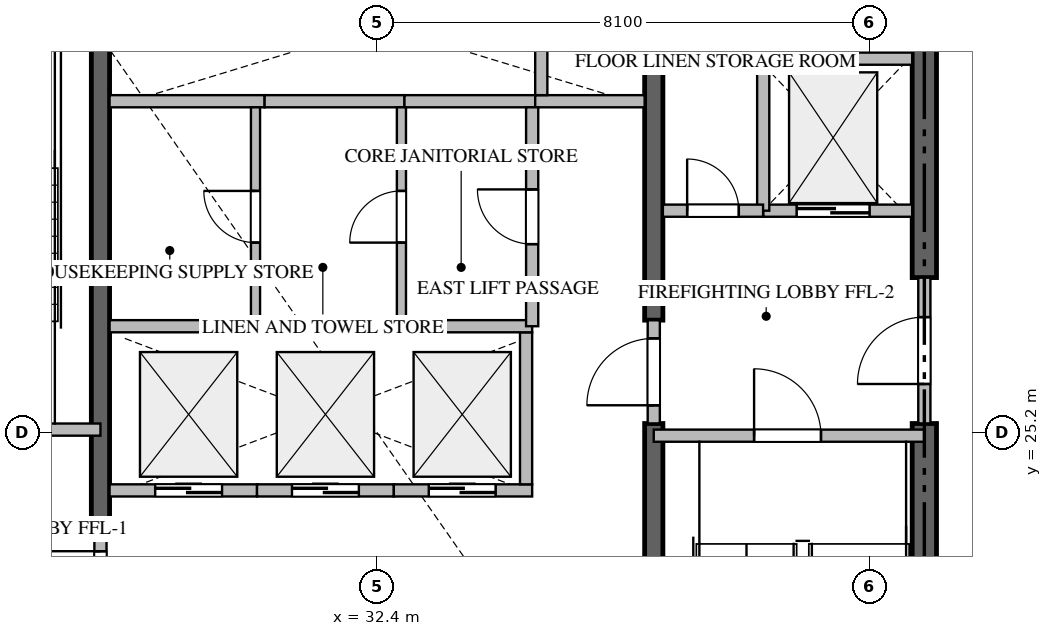
"""IFC4 building model, lengths in metres.
Left out: names, types, materials, properties, quantities, classifications, styles, units other than length and angle.
Written with IfcOpenShell. Run it as: python <this file> out.ifc"""

import sys

from ifc_helpers import new_model, si_unit, direction, frame, frame_2d, origin, place, context, subcontext, project, spatial, rectangle, extrude, source, transform, mapped, element, fill, save


model = new_model("IFC4")
c1 = context("Model", 3, precision=1e-05, world=origin(), true_north=direction((0.0, 1.0)))
c2 = subcontext(c1, "Body", "Model", "MODEL_VIEW")
j1 = project(units=[si_unit("LENGTHUNIT", "METRE"), si_unit("PLANEANGLEUNIT", "RADIAN")], contexts=[c1])
p1 = place(None, origin())
s1 = spatial("IfcSite", under=j1, at=p1, CompositionType="ELEMENT")
p2 = place(p1, origin())
s2 = spatial("IfcBuilding", under=s1, at=p2, CompositionType="ELEMENT")
p3 = place(p2, frame((0.0, 0.0, 176.4)))
s3 = spatial("IfcBuildingStorey", under=s2, at=p3, CompositionType="ELEMENT", Elevation=176.4)
p4 = place(p3, frame((41.4, 17.0, -0.26), z_axis=(0.0, 0.0, 1.0), x_axis=(0.0, 1.0, 0.0)))
e1 = element("IfcWall", 1, at=p4, inside=s3, PredefinedType="SHEAR", context=c2, shape_type="SweptSolid", body=[
    extrude(rectangle(XDim=8.35, YDim=0.4, at=frame_2d((4.175, 0.0))), origin(), (0.0, 0.0, 1.0), 3.748),
])
p5 = place(p3, frame((41.4, 27.75, -0.26), z_axis=(0.0, 0.0, 1.0), x_axis=(0.0, 1.0, 0.0)))
e2 = element("IfcWall", 2, at=p5, inside=s3, PredefinedType="SHEAR", context=c2, shape_type="SweptSolid", body=[
    extrude(rectangle(XDim=5.65, YDim=0.4, at=frame_2d((2.825, 0.0))), origin(), (0.0, 0.0, 1.0), 3.748),
])
p6 = place(p3, frame((27.85, 23.55, -0.26), z_axis=(0.0, 0.0, 1.0), x_axis=(0.0, 1.0, 0.0)))
e3 = element("IfcWall", 3, at=p6, inside=s3, PredefinedType="SHEAR", context=c2, shape_type="SweptSolid", body=[
    extrude(rectangle(XDim=9.85, YDim=0.3, at=frame_2d((4.925, 0.0))), origin(), (0.0, 0.0, 1.0), 3.748),
])
p7 = place(p3, frame((36.95, 17.0, -0.26), z_axis=(0.0, 0.0, 1.0), x_axis=(0.0, 1.0, 0.0)))
e4 = element("IfcWall", 4, at=p7, inside=s3, PredefinedType="SHEAR", context=c2, shape_type="SweptSolid", body=[
    extrude(rectangle(XDim=8.35, YDim=0.3, at=frame_2d((4.175, 0.0))), origin(), (0.0, 0.0, 1.0), 3.748),
])
p8 = place(p3, frame((36.95, 27.05, -0.26), z_axis=(0.0, 0.0, 1.0), x_axis=(0.0, 1.0, 0.0)))
e5 = element("IfcWall", 5, at=p8, inside=s3, PredefinedType="SHEAR", context=c2, shape_type="SweptSolid", body=[
    extrude(rectangle(XDim=6.35, YDim=0.3, at=frame_2d((3.175, 0.0))), origin(), (0.0, 0.0, 1.0), 3.748),
])
p9 = place(p3, frame((23.4, 25.25, 0.0), z_axis=(0.0, 0.0, 1.0), x_axis=(1.0, 0.0, 0.0)))
e6 = element("IfcWall", 6, at=p9, inside=s3, PredefinedType="STANDARD", context=c2, shape_type="SweptSolid", body=[
    extrude(rectangle(XDim=4.45, YDim=0.2, at=frame_2d((2.225, 0.0))), origin(), (0.0, 0.0, 1.0), 3.49),
])
p10 = place(p9, frame((1.65, 0.0, 0.0)))
e7 = element("IfcOpeningElement", 7, at=p10, cuts=e6, PredefinedType="OPENING", context=c2, shape_type="SweptSolid", body=[
    extrude(rectangle(XDim=1.1, YDim=2.15, at=frame_2d((0.55, 1.075))), frame((0.0, 0.11, 0.0), z_axis=(0.0, -1.0, 0.0), x_axis=(1.0, 0.0, 0.0)), (0.0, 0.0, 1.0), 0.22),
])
p11 = place(p3, frame((36.95, 25.15, 0.0), z_axis=(0.0, 0.0, 1.0), x_axis=(1.0, 0.0, 0.0)))
e8 = element("IfcWall", 8, at=p11, inside=s3, PredefinedType="STANDARD", context=c2, shape_type="SweptSolid", body=[
    extrude(rectangle(XDim=4.45, YDim=0.2, at=frame_2d((2.225, 0.0))), origin(), (0.0, 0.0, 1.0), 3.49),
])
p12 = place(p11, frame((1.65, 0.0, 0.0)))
e9 = element("IfcOpeningElement", 9, at=p12, cuts=e8, PredefinedType="OPENING", context=c2, shape_type="SweptSolid", body=[
    extrude(rectangle(XDim=1.1, YDim=2.15, at=frame_2d((0.55, 1.075))), frame((0.0, 0.11, 0.0), z_axis=(0.0, -1.0, 0.0), x_axis=(1.0, 0.0, 0.0)), (0.0, 0.0, 1.0), 0.22),
])
p13 = place(p3, frame((38.75, 28.85, 0.0), z_axis=(0.0, 0.0, 1.0), x_axis=(1.0, 0.0, 0.0)))
e10 = element("IfcWall", 10, at=p13, inside=s3, PredefinedType="STANDARD", context=c2, shape_type="SweptSolid", body=[
    extrude(rectangle(XDim=2.45, YDim=0.2, at=frame_2d((1.225, 0.0))), origin(), (0.0, 0.0, 1.0), 3.49),
])
p14 = place(p13, frame((0.55, 0.0, 0.0)))
e11 = element("IfcOpeningElement", 11, at=p14, cuts=e10, PredefinedType="OPENING", context=c2, shape_type="SweptSolid", body=[
    extrude(rectangle(XDim=1.2, YDim=2.2, at=frame_2d((0.6, 1.1))), frame((0.0, 0.11, 0.0), z_axis=(0.0, -1.0, 0.0), x_axis=(1.0, 0.0, 0.0)), (0.0, 0.0, 1.0), 0.22),
])
p15 = place(p3, frame((28.0, 24.25, 0.0), z_axis=(0.0, 0.0, 1.0), x_axis=(1.0, 0.0, 0.0)))
e12 = element("IfcWall", 12, at=p15, inside=s3, PredefinedType="STANDARD", context=c2, shape_type="SweptSolid", body=[
    extrude(rectangle(XDim=2.425, YDim=0.2, at=frame_2d((1.212, 0.0))), origin(), (0.0, 0.0, 1.0), 3.49),
])
p16 = place(p15, frame((0.75, 0.0, 0.0)))
e13 = element("IfcOpeningElement", 13, at=p16, cuts=e12, PredefinedType="OPENING", context=c2, shape_type="SweptSolid", body=[
    extrude(rectangle(XDim=1.1, YDim=2.2, at=frame_2d((0.55, 1.1))), frame((0.0, 0.11, 0.0), z_axis=(0.0, -1.0, 0.0), x_axis=(1.0, 0.0, 0.0)), (0.0, 0.0, 1.0), 0.22),
])
p17 = place(p3, frame((30.425, 24.25, 0.0), z_axis=(0.0, 0.0, 1.0), x_axis=(1.0, 0.0, 0.0)))
e14 = element("IfcWall", 14, at=p17, inside=s3, PredefinedType="STANDARD", context=c2, shape_type="SweptSolid", body=[
    extrude(rectangle(XDim=2.25, YDim=0.2, at=frame_2d((1.125, 0.0))), origin(), (0.0, 0.0, 1.0), 3.49),
])
p18 = place(p17, frame((0.575, 0.0, 0.0)))
e15 = element("IfcOpeningElement", 15, at=p18, cuts=e14, PredefinedType="OPENING", context=c2, shape_type="SweptSolid", body=[
    extrude(rectangle(XDim=1.1, YDim=2.2, at=frame_2d((0.55, 1.1))), frame((0.0, 0.11, 0.0), z_axis=(0.0, -1.0, 0.0), x_axis=(1.0, 0.0, 0.0)), (0.0, 0.0, 1.0), 0.22),
])
p19 = place(p3, frame((32.675, 24.25, 0.0), z_axis=(0.0, 0.0, 1.0), x_axis=(1.0, 0.0, 0.0)))
e16 = element("IfcWall", 16, at=p19, inside=s3, PredefinedType="STANDARD", context=c2, shape_type="SweptSolid", body=[
    extrude(rectangle(XDim=2.275, YDim=0.2, at=frame_2d((1.137, 0.0))), origin(), (0.0, 0.0, 1.0), 3.49),
])
p20 = place(p19, frame((0.575, 0.0, 0.0)))
e17 = element("IfcOpeningElement", 17, at=p20, cuts=e16, PredefinedType="OPENING", context=c2, shape_type="SweptSolid", body=[
    extrude(rectangle(XDim=1.1, YDim=2.2, at=frame_2d((0.55, 1.1))), frame((0.0, 0.11, 0.0), z_axis=(0.0, -1.0, 0.0), x_axis=(1.0, 0.0, 0.0)), (0.0, 0.0, 1.0), 0.22),
])
p21 = place(p3, frame((34.85, 24.35, 0.0), z_axis=(0.0, 0.0, 1.0), x_axis=(0.0, 1.0, 0.0)))
e18 = element("IfcWall", 18, at=p21, inside=s3, PredefinedType="STANDARD", context=c2, shape_type="SweptSolid", body=[
    extrude(rectangle(XDim=2.5, YDim=0.2, at=frame_2d((1.25, 0.0))), origin(), (0.0, 0.0, 1.0), 3.49),
])
p22 = place(p3, frame((28.0, 30.65, 0.0), z_axis=(0.0, 0.0, 1.0), x_axis=(1.0, 0.0, 0.0)))
e19 = element("IfcWall", 19, at=p22, inside=s3, PredefinedType="STANDARD", context=c2, shape_type="SweptSolid", body=[
    extrude(rectangle(XDim=2.55, YDim=0.2, at=frame_2d((1.275, 0.0))), origin(), (0.0, 0.0, 1.0), 3.49),
])
p23 = place(p3, frame((30.55, 30.65, 0.0), z_axis=(0.0, 0.0, 1.0), x_axis=(1.0, 0.0, 0.0)))
e20 = element("IfcWall", 20, at=p23, inside=s3, PredefinedType="STANDARD", context=c2, shape_type="SweptSolid", body=[
    extrude(rectangle(XDim=2.3, YDim=0.2, at=frame_2d((1.15, 0.0))), origin(), (0.0, 0.0, 1.0), 3.49),
])
p24 = place(p3, frame((32.85, 30.65, 0.0), z_axis=(0.0, 0.0, 1.0), x_axis=(1.0, 0.0, 0.0)))
e21 = element("IfcWall", 21, at=p24, inside=s3, PredefinedType="STANDARD", context=c2, shape_type="SweptSolid", body=[
    extrude(rectangle(XDim=2.15, YDim=0.2, at=frame_2d((1.075, 0.0))), origin(), (0.0, 0.0, 1.0), 3.49),
])
p25 = place(p3, frame((35.0, 30.65, 0.0), z_axis=(0.0, 0.0, 1.0), x_axis=(1.0, 0.0, 0.0)))
e22 = element("IfcWall", 22, at=p25, inside=s3, PredefinedType="STANDARD", context=c2, shape_type="SweptSolid", body=[
    extrude(rectangle(XDim=1.8, YDim=0.2, at=frame_2d((0.9, 0.0))), origin(), (0.0, 0.0, 1.0), 3.49),
])
p26 = place(p3, frame((35.1, 30.75, 0.0), z_axis=(0.0, 0.0, 1.0), x_axis=(0.0, 1.0, 0.0)))
e23 = element("IfcWall", 23, at=p26, inside=s3, PredefinedType="STANDARD", context=c2, shape_type="SweptSolid", body=[
    extrude(rectangle(XDim=2.65, YDim=0.2, at=frame_2d((1.325, 0.0))), origin(), (0.0, 0.0, 1.0), 3.49),
])
p27 = place(p3, frame((38.75, 28.85, 0.0), z_axis=(0.0, 0.0, 1.0), x_axis=(0.0, 1.0, 0.0)))
e24 = element("IfcWall", 24, at=p27, inside=s3, PredefinedType="STANDARD", context=c2, shape_type="SweptSolid", body=[
    extrude(rectangle(XDim=2.5, YDim=0.2, at=frame_2d((1.25, 0.0))), origin(), (0.0, 0.0, 1.0), 3.49),
])
p28 = place(p3, frame((38.75, 31.35, 0.0), z_axis=(0.0, 0.0, 1.0), x_axis=(1.0, 0.0, 0.0)))
e25 = element("IfcWall", 25, at=p28, inside=s3, PredefinedType="STANDARD", context=c2, shape_type="SweptSolid", body=[
    extrude(rectangle(XDim=2.45, YDim=0.2, at=frame_2d((1.225, 0.0))), origin(), (0.0, 0.0, 1.0), 3.49),
])
p29 = place(p3, frame((37.1, 28.85, 0.0), z_axis=(0.0, 0.0, 1.0), x_axis=(1.0, 0.0, 0.0)))
e26 = element("IfcWall", 26, at=p29, inside=s3, PredefinedType="STANDARD", context=c2, shape_type="SweptSolid", body=[
    extrude(rectangle(XDim=1.648, YDim=0.2, at=frame_2d((0.824, 0.0))), origin(), (0.0, 0.0, 1.0), 3.49),
])
p30 = place(p29, frame((0.399, 0.0, 0.0)))
e27 = element("IfcOpeningElement", 27, at=p30, cuts=e26, PredefinedType="OPENING", context=c2, shape_type="SweptSolid", body=[
    extrude(rectangle(XDim=0.85, YDim=2.1, at=frame_2d((0.425, 1.05))), frame((0.0, 0.11, 0.0), z_axis=(0.0, -1.0, 0.0), x_axis=(1.0, 0.0, 0.0)), (0.0, 0.0, 1.0), 0.22),
])
p31 = place(p3, frame((41.4, 25.352, 0.0), z_axis=(0.0, 0.0, 1.0), x_axis=(0.0, 1.0, 0.0)))
e28 = element("IfcWall", 28, at=p31, inside=s3, PredefinedType="STANDARD", context=c2, shape_type="SweptSolid", body=[
    extrude(rectangle(XDim=2.396, YDim=0.2, at=frame_2d((1.198, 0.0))), origin(), (0.0, 0.0, 1.0), 3.49),
])
p32 = place(p31, frame((0.648, 0.0, 0.0)))
e29 = element("IfcOpeningElement", 29, at=p32, cuts=e28, PredefinedType="OPENING", context=c2, shape_type="SweptSolid", body=[
    extrude(rectangle(XDim=1.1, YDim=2.15, at=frame_2d((0.55, 1.075))), frame((0.0, 0.11, 0.0), z_axis=(0.0, -1.0, 0.0), x_axis=(1.0, 0.0, 0.0)), (0.0, 0.0, 1.0), 0.22),
])
p33 = place(p3, frame((27.85, 21.852, 0.0), z_axis=(0.0, 0.0, 1.0), x_axis=(0.0, 1.0, 0.0)))
e30 = element("IfcWall", 30, at=p33, inside=s3, PredefinedType="STANDARD", context=c2, shape_type="SweptSolid", body=[
    extrude(rectangle(XDim=1.696, YDim=0.2, at=frame_2d((0.848, 0.0))), origin(), (0.0, 0.0, 1.0), 3.49),
])
p34 = place(p33, frame((0.298, 0.0, 0.0)))
e31 = element("IfcOpeningElement", 31, at=p34, cuts=e30, PredefinedType="OPENING", context=c2, shape_type="SweptSolid", body=[
    extrude(rectangle(XDim=1.1, YDim=2.15, at=frame_2d((0.55, 1.075))), frame((0.0, 0.11, 0.0), z_axis=(0.0, -1.0, 0.0), x_axis=(1.0, 0.0, 0.0)), (0.0, 0.0, 1.0), 0.22),
])
p35 = place(p3, frame((36.95, 25.352, 0.0), z_axis=(0.0, 0.0, 1.0), x_axis=(0.0, 1.0, 0.0)))
e32 = element("IfcWall", 32, at=p35, inside=s3, PredefinedType="STANDARD", context=c2, shape_type="SweptSolid", body=[
    extrude(rectangle(XDim=1.696, YDim=0.2, at=frame_2d((0.848, 0.0))), origin(), (0.0, 0.0, 1.0), 3.49),
])
p36 = place(p35, frame((0.298, 0.0, 0.0)))
e33 = element("IfcOpeningElement", 33, at=p36, cuts=e32, PredefinedType="OPENING", context=c2, shape_type="SweptSolid", body=[
    extrude(rectangle(XDim=1.1, YDim=2.15, at=frame_2d((0.55, 1.075))), frame((0.0, 0.11, 0.0), z_axis=(0.0, -1.0, 0.0), x_axis=(1.0, 0.0, 0.0)), (0.0, 0.0, 1.0), 0.22),
])
p37 = place(p3, frame((28.0, 26.95, 0.0), z_axis=(0.0, 0.0, 1.0), x_axis=(1.0, 0.0, 0.0)))
e34 = element("IfcWall", 34, at=p37, inside=s3, PredefinedType="STANDARD", context=c2, shape_type="SweptSolid", body=[
    extrude(rectangle(XDim=6.95, YDim=0.2, at=frame_2d((3.475, 0.0))), origin(), (0.0, 0.0, 1.0), 3.49),
])
p38 = place(p3, frame((39.4, 31.35, 0.0), z_axis=(0.0, 0.0, 1.0), x_axis=(0.0, 1.0, 0.0)))
e35 = element("IfcWall", 35, at=p38, inside=s3, PredefinedType="PARTITIONING", context=c2, shape_type="SweptSolid", body=[
    extrude(rectangle(XDim=2.05, YDim=0.15, at=frame_2d((1.025, 0.0))), origin(), (0.0, 0.0, 1.0), 3.49),
])
p39 = place(p38, frame((0.6, 0.0, 0.0)))
e36 = element("IfcOpeningElement", 36, at=p39, cuts=e35, PredefinedType="OPENING", context=c2, shape_type="SweptSolid", body=[
    extrude(rectangle(XDim=0.85, YDim=2.1, at=frame_2d((0.425, 1.05))), frame((0.0, 0.085, 0.0), z_axis=(0.0, -1.0, 0.0), x_axis=(1.0, 0.0, 0.0)), (0.0, 0.0, 1.0), 0.17),
])
p40 = place(p3, frame((34.95, 26.95, 0.0), z_axis=(0.0, 0.0, 1.0), x_axis=(0.0, 1.0, 0.0)))
e37 = element("IfcWall", 37, at=p40, inside=s3, PredefinedType="STANDARD", context=c2, shape_type="SweptSolid", body=[
    extrude(rectangle(XDim=3.6, YDim=0.2, at=frame_2d((1.8, 0.0))), origin(), (0.0, 0.0, 1.0), 3.49),
])
p41 = place(p40, frame((1.35, 0.0, 0.0)))
e38 = element("IfcOpeningElement", 38, at=p41, cuts=e37, PredefinedType="OPENING", context=c2, shape_type="SweptSolid", body=[
    extrude(rectangle(XDim=0.9, YDim=2.1, at=frame_2d((0.45, 1.05))), frame((0.0, 0.11, 0.0), z_axis=(0.0, -1.0, 0.0), x_axis=(1.0, 0.0, 0.0)), (0.0, 0.0, 1.0), 0.22),
])
p42 = place(p3, frame((32.8, 26.95, 0.0), z_axis=(0.0, 0.0, 1.0), x_axis=(0.0, 1.0, 0.0)))
e39 = element("IfcWall", 39, at=p42, inside=s3, PredefinedType="PARTITIONING", context=c2, shape_type="SweptSolid", body=[
    extrude(rectangle(XDim=3.6, YDim=0.15, at=frame_2d((1.8, 0.0))), origin(), (0.0, 0.0, 1.0), 3.49),
])
p43 = place(p42, frame((1.375, 0.0, 0.0)))
e40 = element("IfcOpeningElement", 40, at=p43, cuts=e39, PredefinedType="OPENING", context=c2, shape_type="SweptSolid", body=[
    extrude(rectangle(XDim=0.85, YDim=2.1, at=frame_2d((0.425, 1.05))), frame((0.0, 0.085, 0.0), z_axis=(0.0, -1.0, 0.0), x_axis=(1.0, 0.0, 0.0)), (0.0, 0.0, 1.0), 0.17),
])
p44 = place(p3, frame((30.4, 26.95, 0.0), z_axis=(0.0, 0.0, 1.0), x_axis=(0.0, 1.0, 0.0)))
e41 = element("IfcWall", 41, at=p44, inside=s3, PredefinedType="PARTITIONING", context=c2, shape_type="SweptSolid", body=[
    extrude(rectangle(XDim=3.6, YDim=0.15, at=frame_2d((1.8, 0.0))), origin(), (0.0, 0.0, 1.0), 3.49),
])
p45 = place(p44, frame((1.375, 0.0, 0.0)))
e42 = element("IfcOpeningElement", 42, at=p45, cuts=e41, PredefinedType="OPENING", context=c2, shape_type="SweptSolid", body=[
    extrude(rectangle(XDim=0.85, YDim=2.1, at=frame_2d((0.425, 1.05))), frame((0.0, 0.085, 0.0), z_axis=(0.0, -1.0, 0.0), x_axis=(1.0, 0.0, 0.0)), (0.0, 0.0, 1.0), 0.17),
])
m1 = source(origin(), c2, "Body", "SweptSolid", [
    extrude(rectangle(XDim=1.1, YDim=2.15, at=frame_2d((0.55, 1.075))), frame((0.0, 0.025, 0.0), z_axis=(0.0, -1.0, 0.0), x_axis=(1.0, 0.0, 0.0)), (0.0, 0.0, 1.0), 0.05),
])
p46 = place(p12, origin())
e43 = element("IfcDoor", 43, at=p46, inside=s3, OperationType="SINGLE_SWING_LEFT", PredefinedType="DOOR", context=c2, shape_type="MappedRepresentation", body=[
    mapped(m1, transform((0.0, 0.0, 0.0), scale=1.0)),
])
fill(e9, e43)
m2 = source(origin(), c2, "Body", "SweptSolid", [
    extrude(rectangle(XDim=1.2, YDim=2.2, at=frame_2d((0.6, 1.1))), frame((0.0, 0.025, 0.0), z_axis=(0.0, -1.0, 0.0), x_axis=(1.0, 0.0, 0.0)), (0.0, 0.0, 1.0), 0.05),
])
p47 = place(p14, origin())
e44 = element("IfcDoor", 44, at=p47, inside=s3, OperationType="DOUBLE_DOOR_SLIDING", PredefinedType="DOOR", context=c2, shape_type="MappedRepresentation", body=[
    mapped(m2, transform((0.0, 0.0, 0.0), scale=1.0)),
])
fill(e11, e44)
m3 = source(origin(), c2, "Body", "SweptSolid", [
    extrude(rectangle(XDim=1.1, YDim=2.2, at=frame_2d((0.55, 1.1))), frame((0.0, 0.025, 0.0), z_axis=(0.0, -1.0, 0.0), x_axis=(1.0, 0.0, 0.0)), (0.0, 0.0, 1.0), 0.05),
])
p48 = place(p16, origin())
e45 = element("IfcDoor", 45, at=p48, inside=s3, OperationType="DOUBLE_DOOR_SLIDING", PredefinedType="DOOR", context=c2, shape_type="MappedRepresentation", body=[
    mapped(m3, transform((0.0, 0.0, 0.0), scale=1.0)),
])
fill(e13, e45)
p49 = place(p18, origin())
e46 = element("IfcDoor", 46, at=p49, inside=s3, OperationType="DOUBLE_DOOR_SLIDING", PredefinedType="DOOR", context=c2, shape_type="MappedRepresentation", body=[
    mapped(m3, transform((0.0, 0.0, 0.0), scale=1.0)),
])
fill(e15, e46)
p50 = place(p20, origin())
e47 = element("IfcDoor", 47, at=p50, inside=s3, OperationType="DOUBLE_DOOR_SLIDING", PredefinedType="DOOR", context=c2, shape_type="MappedRepresentation", body=[
    mapped(m3, transform((0.0, 0.0, 0.0), scale=1.0)),
])
fill(e17, e47)
m4 = source(origin(), c2, "Body", "SweptSolid", [
    extrude(rectangle(XDim=0.85, YDim=2.1, at=frame_2d((0.425, 1.05))), frame((0.0, 0.025, 0.0), z_axis=(0.0, -1.0, 0.0), x_axis=(1.0, 0.0, 0.0)), (0.0, 0.0, 1.0), 0.05),
])
p51 = place(p30, origin())
e48 = element("IfcDoor", 48, at=p51, inside=s3, OperationType="SINGLE_SWING_LEFT", PredefinedType="DOOR", context=c2, shape_type="MappedRepresentation", body=[
    mapped(m4, transform((0.0, 0.0, 0.0), scale=1.0)),
])
fill(e27, e48)
p52 = place(p32, origin())
e49 = element("IfcDoor", 49, at=p52, inside=s3, OperationType="SINGLE_SWING_LEFT", PredefinedType="DOOR", context=c2, shape_type="MappedRepresentation", body=[
    mapped(m1, transform((0.0, 0.0, 0.0), scale=1.0)),
])
fill(e29, e49)
p53 = place(p34, origin())
e50 = element("IfcDoor", 50, at=p53, inside=s3, OperationType="SINGLE_SWING_RIGHT", PredefinedType="DOOR", context=c2, shape_type="MappedRepresentation", body=[
    mapped(m1, transform((0.0, 0.0, 0.0), scale=1.0)),
])
fill(e31, e50)
p54 = place(p36, origin())
e51 = element("IfcDoor", 51, at=p54, inside=s3, OperationType="SINGLE_SWING_LEFT", PredefinedType="DOOR", context=c2, shape_type="MappedRepresentation", body=[
    mapped(m1, transform((0.0, 0.0, 0.0), scale=1.0)),
])
fill(e33, e51)
m5 = source(origin(), c2, "Body", "SweptSolid", [
    extrude(rectangle(XDim=0.9, YDim=2.1, at=frame_2d((0.45, 1.05))), frame((0.0, 0.025, 0.0), z_axis=(0.0, -1.0, 0.0), x_axis=(1.0, 0.0, 0.0)), (0.0, 0.0, 1.0), 0.05),
])
p55 = place(p41, origin())
e52 = element("IfcDoor", 52, at=p55, inside=s3, OperationType="SINGLE_SWING_RIGHT", PredefinedType="DOOR", context=c2, shape_type="MappedRepresentation", body=[
    mapped(m5, transform((0.0, 0.0, 0.0), scale=1.0)),
])
fill(e38, e52)
p56 = place(p43, origin())
e53 = element("IfcDoor", 53, at=p56, inside=s3, OperationType="SINGLE_SWING_LEFT", PredefinedType="DOOR", context=c2, shape_type="MappedRepresentation", body=[
    mapped(m4, transform((0.0, 0.0, 0.0), scale=1.0)),
])
fill(e40, e53)
p57 = place(p45, origin())
e54 = element("IfcDoor", 54, at=p57, inside=s3, OperationType="SINGLE_SWING_RIGHT", PredefinedType="DOOR", context=c2, shape_type="MappedRepresentation", body=[
    mapped(m4, transform((0.0, 0.0, 0.0), scale=1.0)),
])
fill(e42, e54)
save(model, sys.argv[1])
